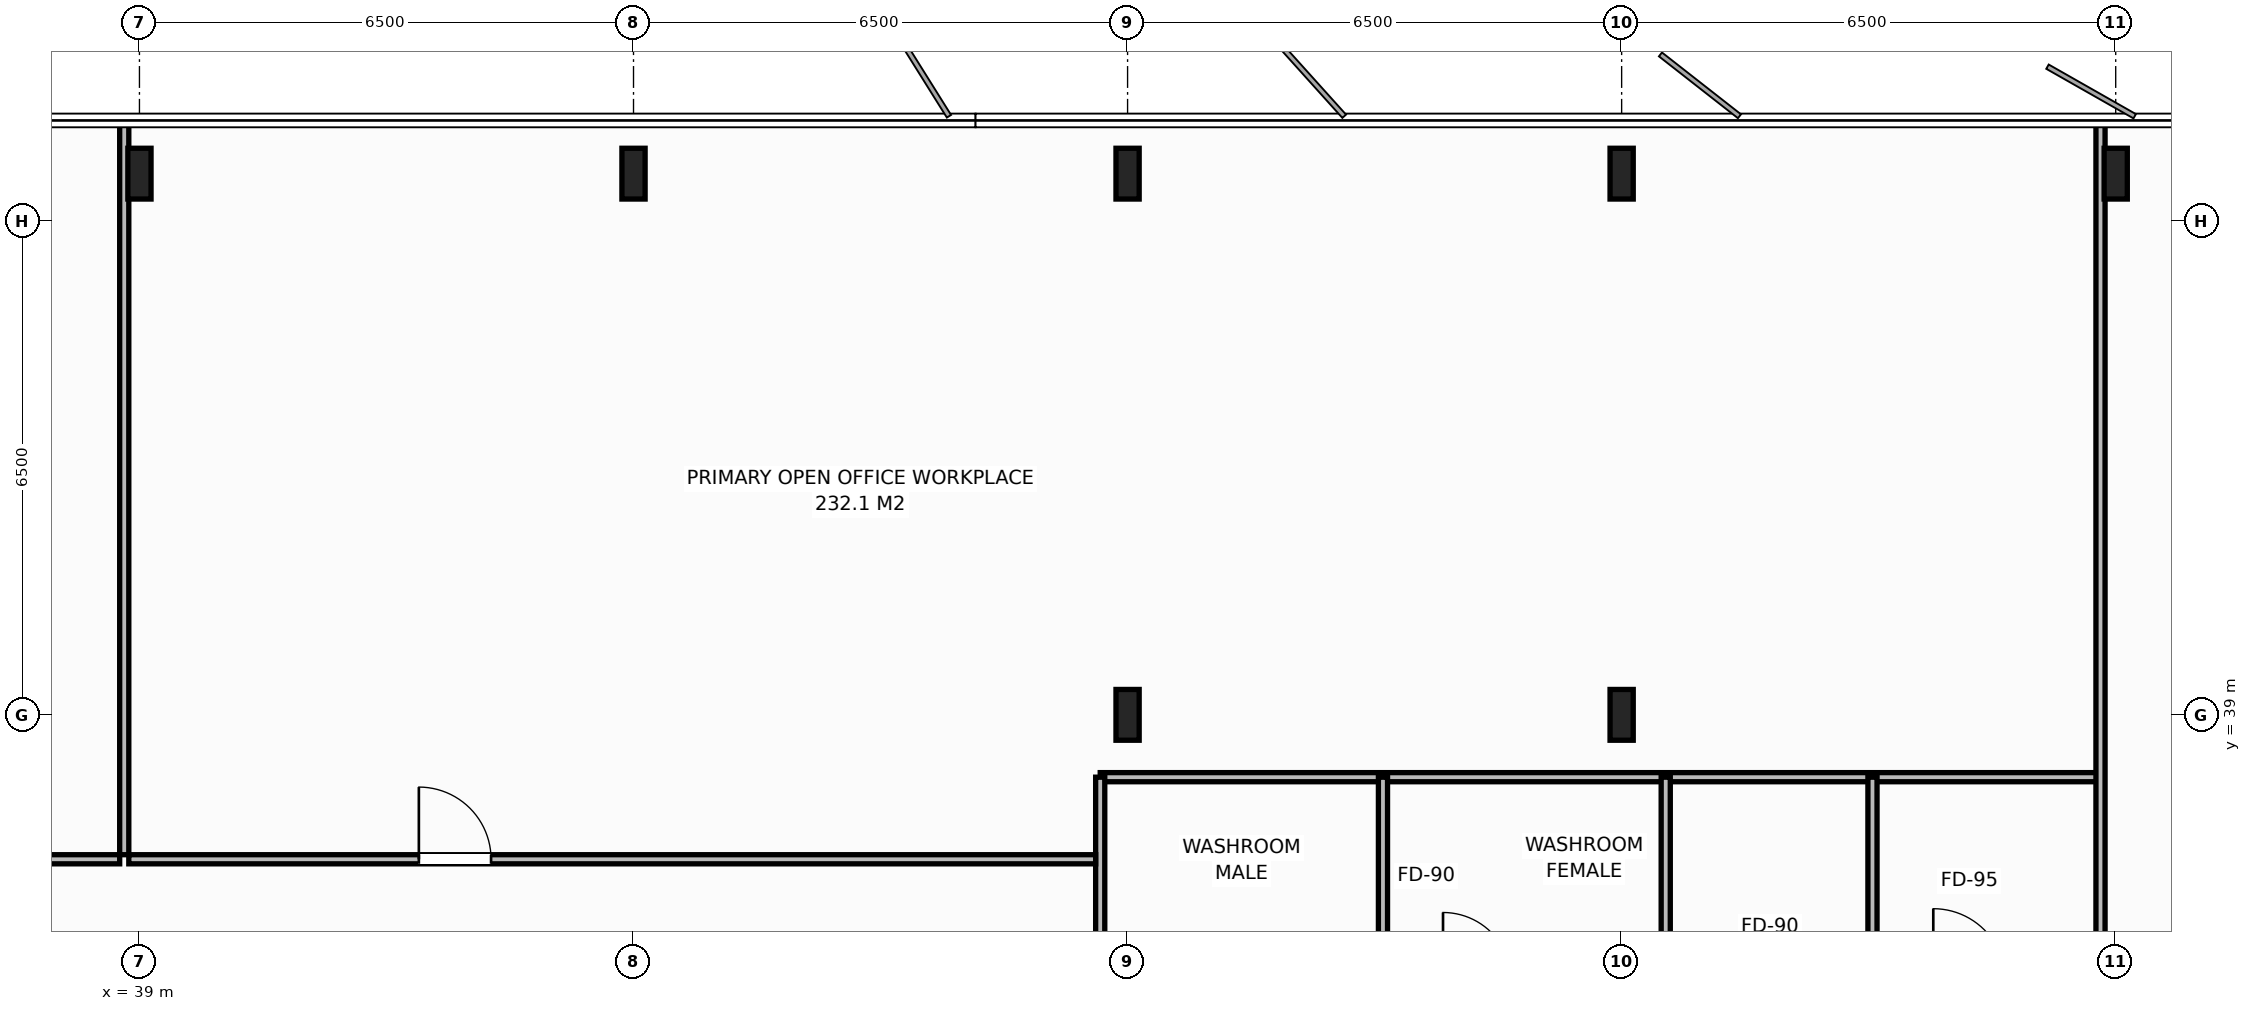
"""IFC4 building model, lengths in metres.
Left out: names, types, materials, properties, quantities, classifications, styles, units other than length and angle.
Written with IfcOpenShell. Run it as: python <this file> out.ifc"""

import sys

from ifc_helpers import new_model, si_unit, direction, frame, frame_2d, origin, origin_2d, place, context, subcontext, project, spatial, rectangle, i_section, extrude, element, fill, save


model = new_model("IFC4")
c1 = context("Model", 3, precision=1e-05, world=origin(), true_north=direction((0.0, 1.0)))
c2 = subcontext(c1, "Body", "Model", "MODEL_VIEW")
j1 = project(units=[si_unit("LENGTHUNIT", "METRE"), si_unit("PLANEANGLEUNIT", "RADIAN")], contexts=[c1])
p1 = place(None, origin())
s1 = spatial("IfcSite", under=j1, at=p1, CompositionType="ELEMENT")
p2 = place(p1, origin())
s2 = spatial("IfcBuilding", under=s1, at=p2, CompositionType="ELEMENT")
p3 = place(p2, frame((0.0, 0.0, 286.4)))
s3 = spatial("IfcBuildingStorey", under=s2, at=p3, CompositionType="ELEMENT", Elevation=286.4)
for number, where, z_axis, x_axis in (
    (1, (58.5, 39.0, 0.0), (0.0, 0.0, 1.0), (1.0, 0.0, 0.0)),
    (2, (52.0, 39.0, 0.0), (0.0, 0.0, 1.0), (1.0, 0.0, 0.0)),
    (3, (39.0, 46.12, 0.0), (0.0, 0.0, 1.0), (1.0, 0.0, 0.0)),
    (4, (45.5, 46.12, 0.0), (0.0, 0.0, 1.0), (1.0, 0.0, 0.0)),
    (5, (52.0, 46.12, 0.0), (0.0, 0.0, 1.0), (1.0, 0.0, 0.0)),
    (6, (58.5, 46.12, 0.0), (0.0, 0.0, 1.0), (1.0, 0.0, 0.0)),
    (7, (65.0, 46.12, 0.0), (0.0, 0.0, 1.0), (1.0, 0.0, 0.0)),
):
    element("IfcColumn", number, at=place(p3, frame(where, z_axis=z_axis, x_axis=x_axis)), inside=s3, PredefinedType="COLUMN", context=c2, shape_type="SweptSolid", body=[
        extrude(i_section(OverallWidth=0.305, OverallDepth=0.668, WebThickness=0.021, FlangeThickness=0.04, at=origin_2d()), origin(), (0.0, 0.0, 1.0), 4.0),
    ])
p4 = place(p3, frame((51.64, 38.18, 0.0), z_axis=(0.0, 0.0, 1.0), x_axis=(1.0, 0.0, 0.0)))
e8 = element("IfcWall", 8, at=p4, inside=s3, PredefinedType="PARTITIONING", context=c2, shape_type="SweptSolid", body=[
    extrude(rectangle(XDim=13.16, YDim=0.12, at=frame_2d((6.58, 0.0))), origin(), (0.0, 0.0, 1.0), 3.788),
])
for number, where, z_axis, x_axis in (
    (9, (51.64, 35.5, 0.0), (0.0, 0.0, 1.0), (0.0, 1.0, 0.0)),
    (10, (55.36, 35.5, 0.0), (0.0, 0.0, 1.0), (0.0, 1.0, 0.0)),
    (11, (59.08, 35.5, 0.0), (0.0, 0.0, 1.0), (0.0, 1.0, 0.0)),
    (12, (61.8, 35.5, 0.0), (0.0, 0.0, 1.0), (0.0, 1.0, 0.0)),
):
    element("IfcWall", number, at=place(p3, frame(where, z_axis=z_axis, x_axis=x_axis)), inside=s3, PredefinedType="PARTITIONING", context=c2, shape_type="SweptSolid", body=[
        extrude(rectangle(XDim=2.68, YDim=0.12, at=frame_2d((1.34, 0.0))), origin(), (0.0, 0.0, 1.0), 3.788),
    ])
p5 = place(p3, frame((38.8, 37.16, 0.0), z_axis=(0.0, 0.0, 1.0), x_axis=(0.0, 1.0, 0.0)))
e13 = element("IfcWall", 13, at=p5, inside=s3, PredefinedType="PARTITIONING", context=c2, shape_type="SweptSolid", body=[
    extrude(rectangle(XDim=9.72, YDim=0.12, at=frame_2d((4.86, 0.0))), origin(), (0.0, 0.0, 1.0), 2.988),
])
p6 = place(p3, frame((33.602, 37.1, 0.0), z_axis=(0.0, 0.0, 1.0), x_axis=(1.0, 0.0, 0.0)))
e14 = element("IfcWall", 14, at=p6, inside=s3, PredefinedType="PARTITIONING", context=c2, shape_type="SweptSolid", body=[
    extrude(rectangle(XDim=5.138, YDim=0.12, at=frame_2d((2.569, 0.0))), origin(), (0.0, 0.0, 1.0), 3.788),
])
p7 = place(p6, frame((2.094, 0.0, 0.0)))
e15 = element("IfcOpeningElement", 15, at=p7, cuts=e14, PredefinedType="OPENING", context=c2, shape_type="SweptSolid", body=[
    extrude(rectangle(XDim=0.95, YDim=2.15, at=frame_2d((0.475, 1.075))), frame((0.0, 0.07, 0.0), z_axis=(0.0, -1.0, 0.0), x_axis=(1.0, 0.0, 0.0)), (0.0, 0.0, 1.0), 0.14),
])
p8 = place(p3, frame((64.8, 35.56, 0.0), z_axis=(0.0, 0.0, 1.0), x_axis=(0.0, 1.0, 0.0)))
e16 = element("IfcWall", 16, at=p8, inside=s3, PredefinedType="PARTITIONING", context=c2, shape_type="SweptSolid", body=[
    extrude(rectangle(XDim=11.32, YDim=0.12, at=frame_2d((5.66, 0.0))), origin(), (0.0, 0.0, 1.0), 2.988),
])
p9 = place(p3, frame((38.86, 37.1, 0.0), z_axis=(0.0, 0.0, 1.0), x_axis=(1.0, 0.0, 0.0)))
e17 = element("IfcWall", 17, at=p9, inside=s3, PredefinedType="PARTITIONING", context=c2, shape_type="SweptSolid", body=[
    extrude(rectangle(XDim=12.72, YDim=0.12, at=frame_2d((6.36, 0.0))), origin(), (0.0, 0.0, 1.0), 3.788),
])
p10 = place(p9, frame((3.816, 0.0, 0.0)))
e18 = element("IfcOpeningElement", 18, at=p10, cuts=e17, PredefinedType="OPENING", context=c2, shape_type="SweptSolid", body=[
    extrude(rectangle(XDim=0.95, YDim=2.15, at=frame_2d((0.475, 1.075))), frame((0.0, 0.07, 0.0), z_axis=(0.0, -1.0, 0.0), x_axis=(1.0, 0.0, 0.0)), (0.0, 0.0, 1.0), 0.14),
])
p11 = place(p10, origin())
e19 = element("IfcDoor", 19, at=p11, inside=s3, OperationType="SINGLE_SWING_LEFT", PredefinedType="DOOR", context=c2, shape_type="SweptSolid", body=[
    extrude(rectangle(XDim=0.95, YDim=2.15, at=frame_2d((0.475, 1.075))), frame((0.0, 0.025, 0.0), z_axis=(0.0, -1.0, 0.0), x_axis=(1.0, 0.0, 0.0)), (0.0, 0.0, 1.0), 0.05),
])
fill(e18, e19)
save(model, sys.argv[1])
